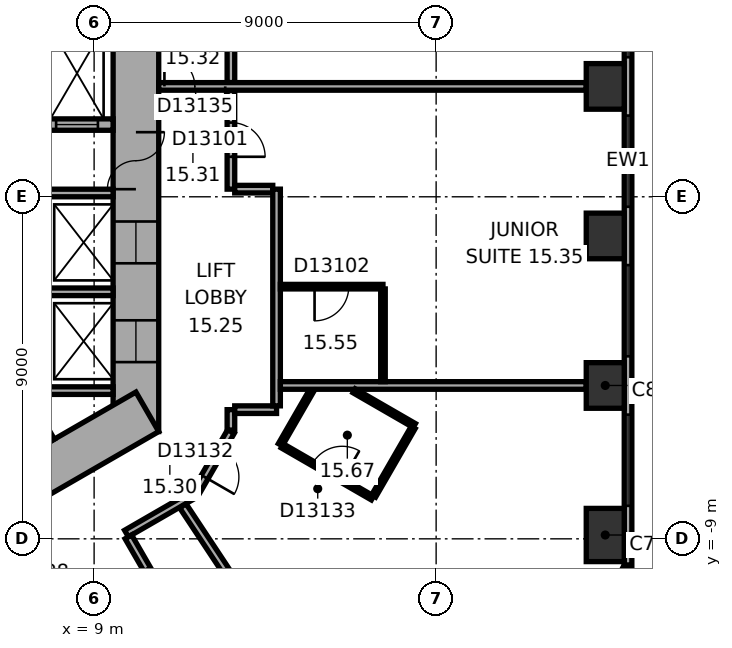
"""IFC4 building model, lengths in metres.
Left out: names, types, materials, properties, quantities, classifications, styles, units other than length and angle.
Written with IfcOpenShell. Run it as: python <this file> out.ifc"""

import sys

from ifc_helpers import new_model, si_unit, direction, frame, frame_2d, origin, origin_2d, place, context, subcontext, project, spatial, rectangle, extrude, element, fill, save


model = new_model("IFC4")
c1 = context("Model", 3, precision=1e-05, world=origin(), true_north=direction((0.0, 1.0)))
c2 = subcontext(c1, "Body", "Model", "MODEL_VIEW")
j1 = project(units=[si_unit("LENGTHUNIT", "METRE"), si_unit("PLANEANGLEUNIT", "RADIAN")], contexts=[c1])
p1 = place(None, origin())
s1 = spatial("IfcSite", under=j1, at=p1, CompositionType="ELEMENT")
p2 = place(p1, origin())
s2 = spatial("IfcBuilding", under=s1, at=p2, CompositionType="ELEMENT")
p3 = place(p2, frame((0.0, 0.0, 70.4)))
s3 = spatial("IfcBuildingStorey", under=s2, at=p3, CompositionType="ELEMENT", Elevation=70.4)
p4 = place(p3, frame((22.45, -8.899, 0.0), z_axis=(0.0, 0.0, 1.0), x_axis=(0.0, 1.0, 0.0)))
e1 = element("IfcColumn", 1, at=p4, inside=s3, PredefinedType="COLUMN", context=c2, shape_type="SweptSolid", body=[
    extrude(rectangle(XDim=1.4, YDim=1.0, at=origin_2d()), origin(), (0.0, 0.0, 1.0), 3.3),
])
for number, where, z_axis, x_axis in (
    (2, (22.45, -4.965, 0.0), (0.0, 0.0, 1.0), (0.0, 1.0, 0.0)),
    (3, (22.45, -1.03, 0.0), (0.0, 0.0, 1.0), (0.0, 1.0, 0.0)),
    (4, (22.45, 2.905, 0.0), (0.0, 0.0, 1.0), (0.0, 1.0, 0.0)),
):
    element("IfcColumn", number, at=place(p3, frame(where, z_axis=z_axis, x_axis=x_axis)), inside=s3, PredefinedType="COLUMN", context=c2, shape_type="SweptSolid", body=[
        extrude(rectangle(XDim=1.2, YDim=1.0, at=origin_2d()), origin(), (0.0, 0.0, 1.0), 3.3),
    ])
p5 = place(p3, frame((10.1, -6.177, 0.0), z_axis=(0.0, 0.0, 1.0), x_axis=(0.0, 1.0, 0.0)))
e5 = element("IfcWall", 5, at=p5, inside=s3, PredefinedType="SHEAR", context=c2, shape_type="SweptSolid", body=[
    extrude(rectangle(XDim=12.355, YDim=1.2, at=frame_2d((6.177, 0.0))), origin(), (0.0, 0.0, 1.0), 3.3),
])
p6 = place(p5, frame((6.378, 0.0, 0.0)))
e6 = element("IfcOpeningElement", 6, at=p6, cuts=e5, PredefinedType="OPENING", context=c2, shape_type="SweptSolid", body=[
    extrude(rectangle(XDim=1.5, YDim=2.1, at=frame_2d((0.75, 1.05))), frame((0.0, 0.61, 0.0), z_axis=(0.0, -1.0, 0.0), x_axis=(1.0, 0.0, 0.0)), (0.0, 0.0, 1.0), 1.22),
])
p7 = place(p5, frame((1.828, 0.0, 0.0)))
e7 = element("IfcOpeningElement", 7, at=p7, cuts=e5, PredefinedType="OPENING", context=c2, shape_type="SweptSolid", body=[
    extrude(rectangle(XDim=1.1, YDim=2.1, at=frame_2d((0.55, 1.05))), frame((0.0, 0.61, 0.0), z_axis=(0.0, -1.0, 0.0), x_axis=(1.0, 0.0, 0.0)), (0.0, 0.0, 1.0), 1.22),
])
p8 = place(p5, frame((4.427, 0.0, 0.0)))
e8 = element("IfcOpeningElement", 8, at=p8, cuts=e5, PredefinedType="OPENING", context=c2, shape_type="SweptSolid", body=[
    extrude(rectangle(XDim=1.1, YDim=2.1, at=frame_2d((0.55, 1.05))), frame((0.0, 0.61, 0.0), z_axis=(0.0, -1.0, 0.0), x_axis=(1.0, 0.0, 0.0)), (0.0, 0.0, 1.0), 1.22),
])
p9 = place(p3, frame((-0.3, -11.836, 0.0), z_axis=(0.0, 0.0, 1.0), x_axis=(0.866021384402, 0.500006961711, 0.0)))
e9 = element("IfcWall", 9, at=p9, inside=s3, PredefinedType="SHEAR", context=c2, shape_type="SweptSolid", body=[
    extrude(rectangle(XDim=12.355, YDim=1.2, at=frame_2d((6.178, 0.0))), origin(), (0.0, 0.0, 1.0), 3.3),
])
p10 = place(p9, frame((4.128, 0.0, 0.0)))
e10 = element("IfcOpeningElement", 10, at=p10, cuts=e9, PredefinedType="OPENING", context=c2, shape_type="SweptSolid", body=[
    extrude(rectangle(XDim=0.9, YDim=2.1, at=frame_2d((0.45, 1.05))), frame((0.0, 0.61, 0.0), z_axis=(0.0, -1.0, 0.0), x_axis=(1.0, 0.0, 0.0)), (0.0, 0.0, 1.0), 1.22),
])
p11 = place(p9, frame((7.928, 0.0, 0.0)))
e11 = element("IfcOpeningElement", 11, at=p11, cuts=e9, PredefinedType="OPENING", context=c2, shape_type="SweptSolid", body=[
    extrude(rectangle(XDim=1.1, YDim=2.1, at=frame_2d((0.55, 1.05))), frame((0.0, 0.61, 0.0), z_axis=(0.0, -1.0, 0.0), x_axis=(1.0, 0.0, 0.0)), (0.0, 0.0, 1.0), 1.22),
])
p12 = place(p3, frame((23.05, -9.687, 0.0), z_axis=(0.0, 0.0, 1.0), x_axis=(0.0, 1.0, 0.0)))
e12 = element("IfcWall", 12, at=p12, inside=s3, PredefinedType="STANDARD", context=c2, shape_type="SweptSolid", body=[
    extrude(rectangle(XDim=21.246, YDim=0.2, at=frame_2d((10.623, 0.0))), origin(), (0.0, 0.0, 1.0), 3.3),
])
p13 = place(p12, frame((1.555, 0.0, 0.8)))
e13 = element("IfcOpeningElement", 13, at=p13, cuts=e12, PredefinedType="OPENING", context=c2, shape_type="SweptSolid", body=[
    extrude(rectangle(XDim=2.4, YDim=1.7, at=frame_2d((1.2, 0.85))), frame((0.0, 0.11, 0.0), z_axis=(0.0, -1.0, 0.0), x_axis=(1.0, 0.0, 0.0)), (0.0, 0.0, 1.0), 0.22),
])
p14 = place(p12, frame((5.489, 0.0, 0.8)))
e14 = element("IfcOpeningElement", 14, at=p14, cuts=e12, PredefinedType="OPENING", context=c2, shape_type="SweptSolid", body=[
    extrude(rectangle(XDim=2.4, YDim=1.7, at=frame_2d((1.2, 0.85))), frame((0.0, 0.11, 0.0), z_axis=(0.0, -1.0, 0.0), x_axis=(1.0, 0.0, 0.0)), (0.0, 0.0, 1.0), 0.22),
])
p15 = place(p12, frame((9.424, 0.0, 0.8)))
e15 = element("IfcOpeningElement", 15, at=p15, cuts=e12, PredefinedType="OPENING", context=c2, shape_type="SweptSolid", body=[
    extrude(rectangle(XDim=2.4, YDim=1.7, at=frame_2d((1.2, 0.85))), frame((0.0, 0.11, 0.0), z_axis=(0.0, -1.0, 0.0), x_axis=(1.0, 0.0, 0.0)), (0.0, 0.0, 1.0), 0.22),
])
p16 = place(p12, frame((13.358, 0.0, 0.8)))
e16 = element("IfcOpeningElement", 16, at=p16, cuts=e12, PredefinedType="OPENING", context=c2, shape_type="SweptSolid", body=[
    extrude(rectangle(XDim=2.4, YDim=1.7, at=frame_2d((1.2, 0.85))), frame((0.0, 0.11, 0.0), z_axis=(0.0, -1.0, 0.0), x_axis=(1.0, 0.0, 0.0)), (0.0, 0.0, 1.0), 0.22),
])
p17 = place(p12, frame((17.293, 0.0, 0.8)))
e17 = element("IfcOpeningElement", 17, at=p17, cuts=e12, PredefinedType="OPENING", context=c2, shape_type="SweptSolid", body=[
    extrude(rectangle(XDim=2.4, YDim=1.7, at=frame_2d((1.2, 0.85))), frame((0.0, 0.11, 0.0), z_axis=(0.0, -1.0, 0.0), x_axis=(1.0, 0.0, 0.0)), (0.0, 0.0, 1.0), 0.22),
])
p18 = place(p3, frame((20.833, -13.839, 0.0), z_axis=(0.0, 0.0, 1.0), x_axis=(0.473321668581, 0.880889662813, 0.0)))
e18 = element("IfcWall", 18, at=p18, inside=s3, PredefinedType="STANDARD", context=c2, shape_type="SweptSolid", body=[
    extrude(rectangle(XDim=4.66, YDim=0.2, at=frame_2d((2.33, 0.0))), origin(), (0.0, 0.0, 1.0), 3.3),
])
p19 = place(p18, frame((0.83, 0.0, 0.8)))
e19 = element("IfcOpeningElement", 19, at=p19, cuts=e18, PredefinedType="OPENING", context=c2, shape_type="SweptSolid", body=[
    extrude(rectangle(XDim=3.0, YDim=1.7, at=frame_2d((1.5, 0.85))), frame((0.0, 0.11, 0.0), z_axis=(0.0, -1.0, 0.0), x_axis=(1.0, 0.0, 0.0)), (0.0, 0.0, 1.0), 0.22),
])
for number, where, z_axis, x_axis in (
    (20, (7.3, -5.1, 0.0), (0.0, 0.0, 1.0), (1.0, 0.0, 0.0)),
    (21, (7.3, -2.5, 0.0), (0.0, 0.0, 1.0), (1.0, 0.0, 0.0)),
    (22, (7.3, 0.1, 0.0), (0.0, 0.0, 1.0), (1.0, 0.0, 0.0)),
    (23, (6.768, -4.522, 0.0), (0.0, 0.0, 1.0), (0.5, -0.866, 0.0)),
):
    element("IfcWall", number, at=place(p3, frame(where, z_axis=z_axis, x_axis=x_axis)), inside=s3, PredefinedType="PARTITIONING", context=c2, shape_type="SweptSolid", body=[
        extrude(rectangle(XDim=2.2, YDim=0.2, at=frame_2d((1.1, 0.0))), origin(), (0.0, 0.0, 1.0), 3.05),
    ])
p20 = place(p3, frame((7.3, 1.9, 0.0), z_axis=(0.0, 0.0, 1.0), x_axis=(1.0, 0.0, 0.0)))
e24 = element("IfcWall", 24, at=p20, inside=s3, PredefinedType="SHEAR", context=c2, shape_type="SweptSolid", body=[
    extrude(rectangle(XDim=2.2, YDim=0.3, at=frame_2d((1.1, 0.0))), origin(), (0.0, 0.0, 1.0), 3.05),
])
p21 = place(p20, frame((0.7, 0.0, 0.0)))
e25 = element("IfcOpeningElement", 25, at=p21, cuts=e24, PredefinedType="OPENING", context=c2, shape_type="SweptSolid", body=[
    extrude(rectangle(XDim=1.1, YDim=2.1, at=frame_2d((0.55, 1.05))), frame((0.0, 0.16, 0.0), z_axis=(0.0, -1.0, 0.0), x_axis=(1.0, 0.0, 0.0)), (0.0, 0.0, 1.0), 0.32),
])
p22 = place(p3, frame((9.852, -8.861, 0.0), z_axis=(0.0, 0.0, 1.0), x_axis=(0.866013291437, 0.500020978615, 0.0)))
e26 = element("IfcWall", 26, at=p22, inside=s3, PredefinedType="PARTITIONING", context=c2, shape_type="SweptSolid", body=[
    extrude(rectangle(XDim=2.077, YDim=0.2, at=frame_2d((1.038, 0.0))), origin(), (0.0, 0.0, 1.0), 3.05),
])
p23 = place(p3, frame((10.402, -9.815, 0.0), z_axis=(0.0, 0.0, 1.0), x_axis=(-0.499968756647, 0.866043441391, 0.0)))
e27 = element("IfcWall", 27, at=p23, inside=s3, PredefinedType="PARTITIONING", context=c2, shape_type="SweptSolid", body=[
    extrude(rectangle(XDim=1.001, YDim=0.2, at=frame_2d((0.5, 0.0))), origin(), (0.0, 0.0, 1.0), 3.05),
])
p24 = place(p3, frame((11.67, -7.788, 0.0), z_axis=(0.0, 0.0, 1.0), x_axis=(0.500063286585, 0.865988862174, 0.0)))
e28 = element("IfcWall", 28, at=p24, inside=s3, PredefinedType="PARTITIONING", context=c2, shape_type="SweptSolid", body=[
    extrude(rectangle(XDim=1.86, YDim=0.2, at=frame_2d((0.93, 0.0))), origin(), (0.0, 0.0, 1.0), 3.05),
])
p25 = place(p24, frame((0.48, 0.0, 0.0)))
e29 = element("IfcOpeningElement", 29, at=p25, cuts=e28, PredefinedType="OPENING", context=c2, shape_type="SweptSolid", body=[
    extrude(rectangle(XDim=0.9, YDim=2.1, at=frame_2d((0.45, 1.05))), frame((0.0, 0.11, 0.0), z_axis=(0.0, -1.0, 0.0), x_axis=(1.0, 0.0, 0.0)), (0.0, 0.0, 1.0), 0.22),
])
p26 = place(p3, frame((12.6, -6.138, 0.0), z_axis=(0.0, 0.0, 1.0), x_axis=(0.0, 1.0, 0.0)))
e30 = element("IfcWall", 30, at=p26, inside=s3, PredefinedType="PARTITIONING", context=c2, shape_type="SweptSolid", body=[
    extrude(rectangle(XDim=0.537, YDim=0.2, at=frame_2d((0.268, 0.0))), origin(), (0.0, 0.0, 1.0), 3.05),
])
p27 = place(p3, frame((12.6, 0.201, 0.0), z_axis=(0.0, 0.0, 1.0), x_axis=(0.0, 1.0, 0.0)))
e31 = element("IfcWall", 31, at=p27, inside=s3, PredefinedType="PARTITIONING", context=c2, shape_type="SweptSolid", body=[
    extrude(rectangle(XDim=2.604, YDim=0.2, at=frame_2d((1.302, 0.0))), origin(), (0.0, 0.0, 1.0), 3.05),
])
p28 = place(p27, frame((0.852, 0.0, 0.0)))
e32 = element("IfcOpeningElement", 32, at=p28, cuts=e31, PredefinedType="OPENING", context=c2, shape_type="SweptSolid", body=[
    extrude(rectangle(XDim=0.9, YDim=2.1, at=frame_2d((0.45, 1.05))), frame((0.0, 0.11, 0.0), z_axis=(0.0, -1.0, 0.0), x_axis=(1.0, 0.0, 0.0)), (0.0, 0.0, 1.0), 0.22),
])
p29 = place(p3, frame((12.6, 3.004, 0.0), z_axis=(0.0, 0.0, 1.0), x_axis=(0.0, 1.0, 0.0)))
e33 = element("IfcWall", 33, at=p29, inside=s3, PredefinedType="PARTITIONING", context=c2, shape_type="SweptSolid", body=[
    extrude(rectangle(XDim=3.173, YDim=0.2, at=frame_2d((1.586, 0.0))), origin(), (0.0, 0.0, 1.0), 3.05),
])
p30 = place(p29, frame((1.136, 0.0, 0.0)))
e34 = element("IfcOpeningElement", 34, at=p30, cuts=e33, PredefinedType="OPENING", context=c2, shape_type="SweptSolid", body=[
    extrude(rectangle(XDim=0.9, YDim=2.1, at=frame_2d((0.45, 1.05))), frame((0.0, 0.11, 0.0), z_axis=(0.0, -1.0, 0.0), x_axis=(1.0, 0.0, 0.0)), (0.0, 0.0, 1.0), 0.22),
])
p31 = place(p3, frame((12.7, -5.601, 0.0), z_axis=(0.0, 0.0, 1.0), x_axis=(1.0, 0.0, 0.0)))
e35 = element("IfcWall", 35, at=p31, inside=s3, PredefinedType="PARTITIONING", context=c2, shape_type="SweptSolid", body=[
    extrude(rectangle(XDim=1.101, YDim=0.2, at=frame_2d((0.551, 0.0))), origin(), (0.0, 0.0, 1.0), 3.05),
])
p32 = place(p3, frame((13.701, 0.201, 0.0), z_axis=(0.0, 0.0, 1.0), x_axis=(-1.0, 0.0, 0.0)))
e36 = element("IfcWall", 36, at=p32, inside=s3, PredefinedType="PARTITIONING", context=c2, shape_type="SweptSolid", body=[
    extrude(rectangle(XDim=1.001, YDim=0.2, at=frame_2d((0.5, 0.0))), origin(), (0.0, 0.0, 1.0), 3.05),
])
p33 = place(p3, frame((13.801, -5.501, 0.0), z_axis=(0.0, 0.0, 1.0), x_axis=(0.0, 1.0, 0.0)))
e37 = element("IfcWall", 37, at=p33, inside=s3, PredefinedType="PARTITIONING", context=c2, shape_type="SweptSolid", body=[
    extrude(rectangle(XDim=5.702, YDim=0.2, at=frame_2d((2.851, 0.0))), origin(), (0.0, 0.0, 1.0), 3.05),
])
p34 = place(p3, frame((13.901, -6.524, 0.0), z_axis=(0.0, 0.0, 1.0), x_axis=(0.499964162598, 0.86604609353, 0.0)))
e38 = element("IfcWall", 38, at=p34, inside=s3, PredefinedType="PARTITIONING", context=c2, shape_type="SweptSolid", body=[
    extrude(rectangle(XDim=1.661, YDim=0.12, at=frame_2d((0.831, 0.0))), origin(), (0.0, 0.0, 1.0), 3.05),
])
p35 = place(p3, frame((13.901, -4.965, 0.0), z_axis=(0.0, 0.0, 1.0), x_axis=(1.0, 0.0, 0.0)))
e39 = element("IfcWall", 39, at=p35, inside=s3, PredefinedType="PARTITIONING", context=c2, shape_type="SweptSolid", body=[
    extrude(rectangle(XDim=8.049, YDim=0.2, at=frame_2d((4.024, 0.0))), origin(), (0.0, 0.0, 1.0), 3.05),
])
p36 = place(p3, frame((13.901, -2.365, 0.0), z_axis=(0.0, 0.0, 1.0), x_axis=(1.0, 0.0, 0.0)))
e40 = element("IfcWall", 40, at=p36, inside=s3, PredefinedType="PARTITIONING", context=c2, shape_type="SweptSolid", body=[
    extrude(rectangle(XDim=2.7, YDim=0.12, at=frame_2d((1.35, 0.0))), origin(), (0.0, 0.0, 1.0), 3.05),
])
p37 = place(p36, frame((0.9, 0.0, 0.0)))
e41 = element("IfcOpeningElement", 41, at=p37, cuts=e40, PredefinedType="OPENING", context=c2, shape_type="SweptSolid", body=[
    extrude(rectangle(XDim=0.9, YDim=2.1, at=frame_2d((0.45, 1.05))), frame((0.0, 0.07, 0.0), z_axis=(0.0, -1.0, 0.0), x_axis=(1.0, 0.0, 0.0)), (0.0, 0.0, 1.0), 0.14),
])
p38 = place(p3, frame((15.841, -5.104, 0.0), z_axis=(0.0, 0.0, 1.0), x_axis=(0.866025591402, -0.499999675036, 0.0)))
e42 = element("IfcWall", 42, at=p38, inside=s3, PredefinedType="PARTITIONING", context=c2, shape_type="SweptSolid", body=[
    extrude(rectangle(XDim=1.83, YDim=0.12, at=frame_2d((0.915, 0.0))), origin(), (0.0, 0.0, 1.0), 3.05),
])
p39 = place(p3, frame((16.255, -15.564, 0.0), z_axis=(0.0, 0.0, 1.0), x_axis=(-0.55192208744, 0.833895682562, 0.0)))
e43 = element("IfcWall", 43, at=p39, inside=s3, PredefinedType="PARTITIONING", context=c2, shape_type="SweptSolid", body=[
    extrude(rectangle(XDim=8.913, YDim=0.2, at=frame_2d((4.457, 0.0))), origin(), (0.0, 0.0, 1.0), 2.6),
])
p40 = place(p3, frame((16.326, -7.925, 0.0), z_axis=(0.0, 0.0, 1.0), x_axis=(-0.865997131366, 0.500048966069, 0.0)))
e44 = element("IfcWall", 44, at=p40, inside=s3, PredefinedType="PARTITIONING", context=c2, shape_type="SweptSolid", body=[
    extrude(rectangle(XDim=2.74, YDim=0.12, at=frame_2d((1.37, 0.0))), origin(), (0.0, 0.0, 1.0), 3.05),
])
p41 = place(p40, frame((0.92, 0.0, 0.0)))
e45 = element("IfcOpeningElement", 45, at=p41, cuts=e44, PredefinedType="OPENING", context=c2, shape_type="SweptSolid", body=[
    extrude(rectangle(XDim=0.9, YDim=2.1, at=frame_2d((0.45, 1.05))), frame((0.0, 0.07, 0.0), z_axis=(0.0, -1.0, 0.0), x_axis=(1.0, 0.0, 0.0)), (0.0, 0.0, 1.0), 0.14),
])
p42 = place(p3, frame((16.601, -2.425, 0.0), z_axis=(0.0, 0.0, 1.0), x_axis=(0.0, -1.0, 0.0)))
e46 = element("IfcWall", 46, at=p42, inside=s3, PredefinedType="PARTITIONING", context=c2, shape_type="SweptSolid", body=[
    extrude(rectangle(XDim=2.44, YDim=0.12, at=frame_2d((1.22, 0.0))), origin(), (0.0, 0.0, 1.0), 3.05),
])
p43 = place(p3, frame((17.396, -6.071, 0.0), z_axis=(0.0, 0.0, 1.0), x_axis=(-0.500027264788, -0.866009661879, 0.0)))
e47 = element("IfcWall", 47, at=p43, inside=s3, PredefinedType="PARTITIONING", context=c2, shape_type="SweptSolid", body=[
    extrude(rectangle(XDim=2.08, YDim=0.12, at=frame_2d((1.04, 0.0))), origin(), (0.0, 0.0, 1.0), 3.05),
])
p44 = place(p3, frame((21.95, 2.905, 0.0), z_axis=(0.0, 0.0, 1.0), x_axis=(-1.0, 0.0, 0.0)))
e48 = element("IfcWall", 48, at=p44, inside=s3, PredefinedType="PARTITIONING", context=c2, shape_type="SweptSolid", body=[
    extrude(rectangle(XDim=11.25, YDim=0.2, at=frame_2d((5.625, 0.0))), origin(), (0.0, 0.0, 1.0), 3.05),
])
p45 = place(p44, frame((9.5, 0.0, 0.0)))
e49 = element("IfcOpeningElement", 49, at=p45, cuts=e48, PredefinedType="OPENING", context=c2, shape_type="SweptSolid", body=[
    extrude(rectangle(XDim=1.6, YDim=2.1, at=frame_2d((0.8, 1.05))), frame((0.0, 0.11, 0.0), z_axis=(0.0, -1.0, 0.0), x_axis=(1.0, 0.0, 0.0)), (0.0, 0.0, 1.0), 0.22),
])
p46 = place(p13, origin())
e50 = element("IfcWindow", 50, at=p46, inside=s3, PartitioningType="SINGLE_PANEL", PredefinedType="WINDOW", context=c2, shape_type="SweptSolid", body=[
    extrude(rectangle(XDim=2.4, YDim=1.7, at=frame_2d((1.2, 0.85))), frame((0.0, 0.03, 0.0), z_axis=(0.0, -1.0, 0.0), x_axis=(1.0, 0.0, 0.0)), (0.0, 0.0, 1.0), 0.06),
])
fill(e13, e50)
p47 = place(p14, origin())
e51 = element("IfcWindow", 51, at=p47, inside=s3, PartitioningType="SINGLE_PANEL", PredefinedType="WINDOW", context=c2, shape_type="SweptSolid", body=[
    extrude(rectangle(XDim=2.4, YDim=1.7, at=frame_2d((1.2, 0.85))), frame((0.0, 0.03, 0.0), z_axis=(0.0, -1.0, 0.0), x_axis=(1.0, 0.0, 0.0)), (0.0, 0.0, 1.0), 0.06),
])
fill(e14, e51)
p48 = place(p15, origin())
e52 = element("IfcWindow", 52, at=p48, inside=s3, PartitioningType="SINGLE_PANEL", PredefinedType="WINDOW", context=c2, shape_type="SweptSolid", body=[
    extrude(rectangle(XDim=2.4, YDim=1.7, at=frame_2d((1.2, 0.85))), frame((0.0, 0.03, 0.0), z_axis=(0.0, -1.0, 0.0), x_axis=(1.0, 0.0, 0.0)), (0.0, 0.0, 1.0), 0.06),
])
fill(e15, e52)
p49 = place(p16, origin())
e53 = element("IfcWindow", 53, at=p49, inside=s3, PartitioningType="SINGLE_PANEL", PredefinedType="WINDOW", context=c2, shape_type="SweptSolid", body=[
    extrude(rectangle(XDim=2.4, YDim=1.7, at=frame_2d((1.2, 0.85))), frame((0.0, 0.03, 0.0), z_axis=(0.0, -1.0, 0.0), x_axis=(1.0, 0.0, 0.0)), (0.0, 0.0, 1.0), 0.06),
])
fill(e16, e53)
p50 = place(p6, origin())
e54 = element("IfcDoor", 54, at=p50, inside=s3, OperationType="DOUBLE_DOOR_SINGLE_SWING", PredefinedType="DOOR", context=c2, shape_type="SweptSolid", body=[
    extrude(rectangle(XDim=1.5, YDim=2.1, at=frame_2d((0.75, 1.05))), frame((0.0, 0.025, 0.0), z_axis=(0.0, -1.0, 0.0), x_axis=(1.0, 0.0, 0.0)), (0.0, 0.0, 1.0), 0.05),
])
fill(e6, e54)
p51 = place(p21, origin())
e55 = element("IfcDoor", 55, at=p51, inside=s3, OperationType="DOUBLE_DOOR_SLIDING", PredefinedType="DOOR", context=c2, shape_type="SweptSolid", body=[
    extrude(rectangle(XDim=1.1, YDim=2.1, at=frame_2d((0.55, 1.05))), frame((0.0, 0.025, 0.0), z_axis=(0.0, -1.0, 0.0), x_axis=(1.0, 0.0, 0.0)), (0.0, 0.0, 1.0), 0.05),
])
fill(e25, e55)
p52 = place(p7, origin())
e56 = element("IfcDoor", 56, at=p52, inside=s3, OperationType="DOUBLE_DOOR_SLIDING", PredefinedType="DOOR", context=c2, shape_type="SweptSolid", body=[
    extrude(rectangle(XDim=1.1, YDim=2.1, at=frame_2d((0.55, 1.05))), frame((0.0, 0.025, 0.0), z_axis=(0.0, -1.0, 0.0), x_axis=(1.0, 0.0, 0.0)), (0.0, 0.0, 1.0), 0.05),
])
fill(e7, e56)
p53 = place(p8, origin())
e57 = element("IfcDoor", 57, at=p53, inside=s3, OperationType="DOUBLE_DOOR_SLIDING", PredefinedType="DOOR", context=c2, shape_type="SweptSolid", body=[
    extrude(rectangle(XDim=1.1, YDim=2.1, at=frame_2d((0.55, 1.05))), frame((0.0, 0.025, 0.0), z_axis=(0.0, -1.0, 0.0), x_axis=(1.0, 0.0, 0.0)), (0.0, 0.0, 1.0), 0.05),
])
fill(e8, e57)
p54 = place(p28, origin())
e58 = element("IfcDoor", 58, at=p54, inside=s3, OperationType="SINGLE_SWING_LEFT", PredefinedType="DOOR", context=c2, shape_type="SweptSolid", body=[
    extrude(rectangle(XDim=0.9, YDim=2.1, at=frame_2d((0.45, 1.05))), frame((0.0, 0.025, 0.0), z_axis=(0.0, -1.0, 0.0), x_axis=(1.0, 0.0, 0.0)), (0.0, 0.0, 1.0), 0.05),
])
fill(e32, e58)
p55 = place(p37, origin())
e59 = element("IfcDoor", 59, at=p55, inside=s3, OperationType="SINGLE_SWING_LEFT", PredefinedType="DOOR", context=c2, shape_type="SweptSolid", body=[
    extrude(rectangle(XDim=0.9, YDim=2.1, at=frame_2d((0.45, 1.05))), frame((0.0, 0.025, 0.0), z_axis=(0.0, -1.0, 0.0), x_axis=(1.0, 0.0, 0.0)), (0.0, 0.0, 1.0), 0.05),
])
fill(e41, e59)
p56 = place(p25, origin())
e60 = element("IfcDoor", 60, at=p56, inside=s3, OperationType="SINGLE_SWING_LEFT", PredefinedType="DOOR", context=c2, shape_type="SweptSolid", body=[
    extrude(rectangle(XDim=0.9, YDim=2.1, at=frame_2d((0.45, 1.05))), frame((0.0, 0.025, 0.0), z_axis=(0.0, -1.0, 0.0), x_axis=(1.0, 0.0, 0.0)), (0.0, 0.0, 1.0), 0.05),
])
fill(e29, e60)
p57 = place(p41, origin())
e61 = element("IfcDoor", 61, at=p57, inside=s3, OperationType="SINGLE_SWING_LEFT", PredefinedType="DOOR", context=c2, shape_type="SweptSolid", body=[
    extrude(rectangle(XDim=0.9, YDim=2.1, at=frame_2d((0.45, 1.05))), frame((0.0, 0.025, 0.0), z_axis=(0.0, -1.0, 0.0), x_axis=(1.0, 0.0, 0.0)), (0.0, 0.0, 1.0), 0.05),
])
fill(e45, e61)
p58 = place(p45, origin())
e62 = element("IfcDoor", 62, at=p58, inside=s3, OperationType="DOUBLE_DOOR_SINGLE_SWING", PredefinedType="DOOR", context=c2, shape_type="SweptSolid", body=[
    extrude(rectangle(XDim=1.6, YDim=2.1, at=frame_2d((0.8, 1.05))), frame((0.0, 0.025, 0.0), z_axis=(0.0, -1.0, 0.0), x_axis=(1.0, 0.0, 0.0)), (0.0, 0.0, 1.0), 0.05),
])
fill(e49, e62)
save(model, sys.argv[1])
